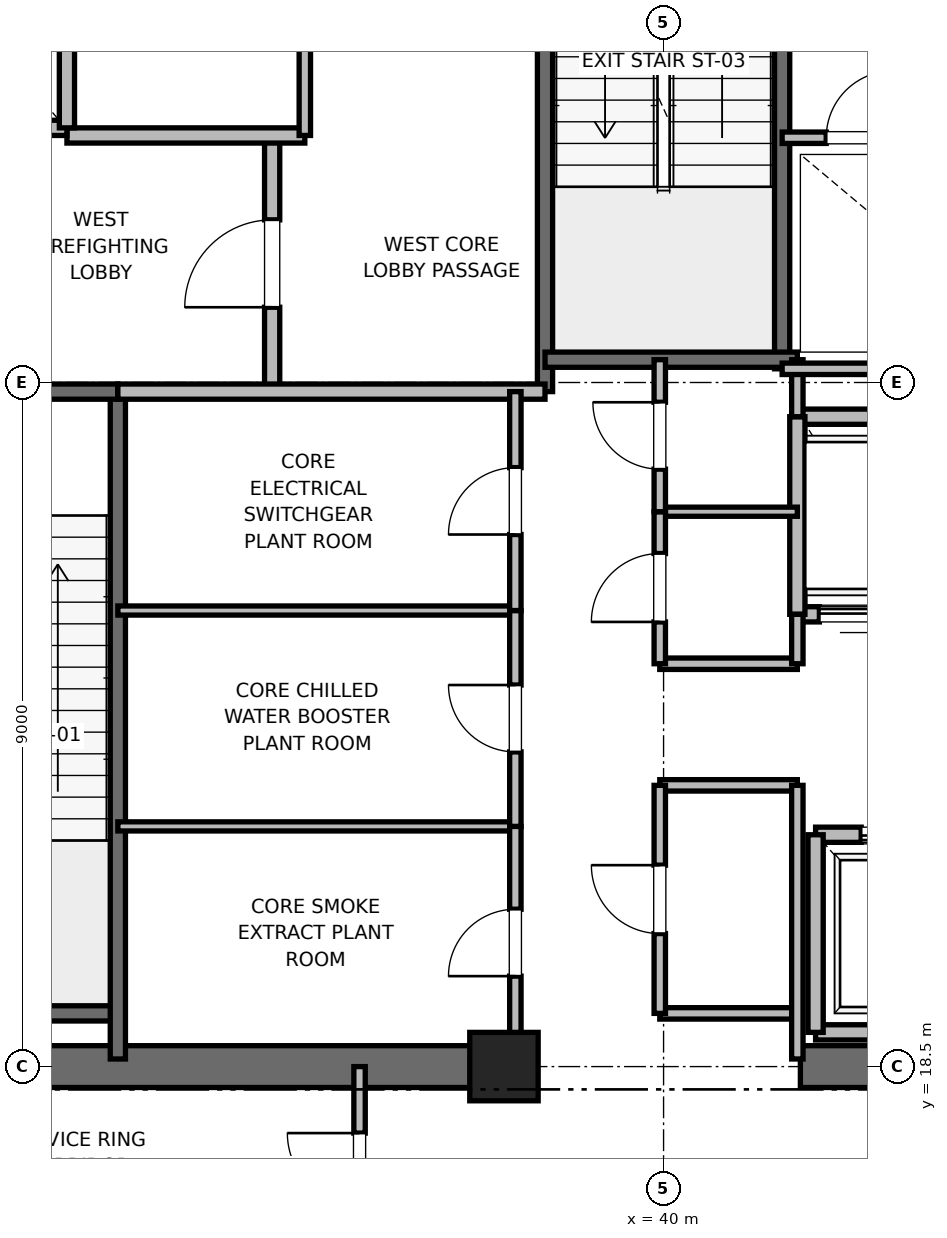
"""IFC4 building model, lengths in metres.
Left out: names, types, materials, properties, quantities, classifications, styles, units other than length and angle.
Written with IfcOpenShell. Run it as: python <this file> out.ifc"""

import sys

from ifc_helpers import new_model, si_unit, direction, frame, frame_2d, origin, origin_2d, place, context, subcontext, project, spatial, rectangle, extrude, element, fill, save


model = new_model("IFC4")
c1 = context("Model", 3, precision=1e-05, world=origin(), true_north=direction((0.0, 1.0)))
c2 = subcontext(c1, "Body", "Model", "MODEL_VIEW")
j1 = project(units=[si_unit("LENGTHUNIT", "METRE"), si_unit("PLANEANGLEUNIT", "RADIAN")], contexts=[c1])
p1 = place(None, origin())
s1 = spatial("IfcSite", under=j1, at=p1, CompositionType="ELEMENT")
p2 = place(p1, origin())
s2 = spatial("IfcBuilding", under=s1, at=p2, CompositionType="ELEMENT")
p3 = place(p2, frame((0.0, 0.0, 194.8)))
s3 = spatial("IfcBuildingStorey", under=s2, at=p3, CompositionType="ELEMENT", Elevation=194.8)
p4 = place(p3, frame((37.9, 18.5, 0.0), z_axis=(0.0, 0.0, 1.0), x_axis=(1.0, 0.0, 0.0)))
e1 = element("IfcColumn", 1, at=p4, inside=s3, PredefinedType="PILASTER", context=c2, shape_type="SweptSolid", body=[
    extrude(rectangle(XDim=0.9, YDim=0.9, at=origin_2d()), origin(), (0.0, 0.0, 1.0), 5.4),
])
for number, where, z_axis, x_axis in (
    (2, (29.0, 18.5, 0.0), (0.0, 0.0, 1.0), (1.0, 0.0, 0.0)),
    (3, (41.8, 18.5, 0.0), (0.0, 0.0, 1.0), (1.0, 0.0, 0.0)),
):
    element("IfcWall", number, at=place(p3, frame(where, z_axis=z_axis, x_axis=x_axis)), inside=s3, PredefinedType="SHEAR", context=c2, shape_type="SweptSolid", body=[
        extrude(rectangle(XDim=9.2, YDim=0.55, at=frame_2d((4.6, 0.0))), origin(), (0.0, 0.0, 1.0), 5.1),
    ])
p5 = place(p3, frame((29.7, 19.2, 0.0), z_axis=(0.0, 0.0, 1.0), x_axis=(1.0, 0.0, 0.0)))
e4 = element("IfcWall", 4, at=p5, inside=s3, PredefinedType="SOLIDWALL", context=c2, shape_type="SweptSolid", body=[
    extrude(rectangle(XDim=3.12, YDim=0.2, at=frame_2d((1.56, 0.0))), origin(), (0.0, 0.0, 1.0), 5.1),
])
p6 = place(p3, frame((32.82, 18.6, 0.0), z_axis=(0.0, 0.0, 1.0), x_axis=(0.0, 1.0, 0.0)))
e5 = element("IfcWall", 5, at=p6, inside=s3, PredefinedType="SOLIDWALL", context=c2, shape_type="SweptSolid", body=[
    extrude(rectangle(XDim=8.78, YDim=0.2, at=frame_2d((4.39, 0.0))), origin(), (0.0, 0.0, 1.0), 5.1),
])
p7 = place(p3, frame((29.7, 27.38, 0.0), z_axis=(0.0, 0.0, 1.0), x_axis=(1.0, 0.0, 0.0)))
e6 = element("IfcWall", 6, at=p7, inside=s3, PredefinedType="SOLIDWALL", context=c2, shape_type="SweptSolid", body=[
    extrude(rectangle(XDim=3.12, YDim=0.2, at=frame_2d((1.56, 0.0))), origin(), (0.0, 0.0, 1.0), 5.1),
])
p8 = place(p7, frame((1.01, 0.0, 0.0)))
e7 = element("IfcOpeningElement", 7, at=p8, cuts=e6, PredefinedType="OPENING", context=c2, shape_type="SweptSolid", body=[
    extrude(rectangle(XDim=1.1, YDim=2.15, at=frame_2d((0.55, 1.075))), frame((0.0, 0.1, 0.0), z_axis=(0.0, -1.0, 0.0), x_axis=(1.0, 0.0, 0.0)), (0.0, 0.0, 1.0), 0.2),
])
p9 = place(p3, frame((38.44, 27.38, 0.0), z_axis=(0.0, 0.0, 1.0), x_axis=(0.0, 1.0, 0.0)))
e8 = element("IfcWall", 8, at=p9, inside=s3, PredefinedType="SOLIDWALL", context=c2, shape_type="SweptSolid", body=[
    extrude(rectangle(XDim=8.87, YDim=0.2, at=frame_2d((4.435, 0.0))), origin(), (0.0, 0.0, 1.0), 5.1),
])
p10 = place(p3, frame((41.56, 27.68, 0.0), z_axis=(0.0, 0.0, 1.0), x_axis=(0.0, 1.0, 0.0)))
e9 = element("IfcWall", 9, at=p10, inside=s3, PredefinedType="SOLIDWALL", context=c2, shape_type="SweptSolid", body=[
    extrude(rectangle(XDim=8.57, YDim=0.2, at=frame_2d((4.285, 0.0))), origin(), (0.0, 0.0, 1.0), 5.1),
])
p11 = place(p3, frame((38.44, 27.8, 0.0), z_axis=(0.0, 0.0, 1.0), x_axis=(1.0, 0.0, 0.0)))
e10 = element("IfcWall", 10, at=p11, inside=s3, PredefinedType="SOLIDWALL", context=c2, shape_type="SweptSolid", body=[
    extrude(rectangle(XDim=3.32, YDim=0.2, at=frame_2d((1.66, 0.0))), origin(), (0.0, 0.0, 1.0), 5.1),
])
p12 = place(p3, frame((34.85, 27.38, 0.0), z_axis=(0.0, 0.0, 1.0), x_axis=(0.0, 1.0, 0.0)))
e11 = element("IfcWall", 11, at=p12, inside=s3, PredefinedType="PARTITIONING", context=c2, shape_type="SweptSolid", body=[
    extrude(rectangle(XDim=3.37, YDim=0.2, at=frame_2d((1.685, 0.0))), origin(), (0.0, 0.0, 1.0), 5.1),
])
p13 = place(p12, frame((1.11, 0.0, 0.0)))
e12 = element("IfcOpeningElement", 12, at=p13, cuts=e11, PredefinedType="OPENING", context=c2, shape_type="SweptSolid", body=[
    extrude(rectangle(XDim=1.15, YDim=2.2, at=frame_2d((0.575, 1.1))), frame((0.0, 0.1, 0.0), z_axis=(0.0, -1.0, 0.0), x_axis=(1.0, 0.0, 0.0)), (0.0, 0.0, 1.0), 0.2),
])
p14 = place(p3, frame((32.82, 27.38, 0.0), z_axis=(0.0, 0.0, 1.0), x_axis=(1.0, 0.0, 0.0)))
e13 = element("IfcWall", 13, at=p14, inside=s3, PredefinedType="PARTITIONING", context=c2, shape_type="SweptSolid", body=[
    extrude(rectangle(XDim=5.62, YDim=0.2, at=frame_2d((2.81, 0.0))), origin(), (0.0, 0.0, 1.0), 5.1),
])
p15 = place(p3, frame((32.15, 30.75, 0.0), z_axis=(0.0, 0.0, 1.0), x_axis=(1.0, 0.0, 0.0)))
e14 = element("IfcWall", 14, at=p15, inside=s3, PredefinedType="PARTITIONING", context=c2, shape_type="SweptSolid", body=[
    extrude(rectangle(XDim=3.13, YDim=0.2, at=frame_2d((1.565, 0.0))), origin(), (0.0, 0.0, 1.0), 5.1),
])
p16 = place(p3, frame((29.55, 30.85, 0.0), z_axis=(0.0, 0.0, 1.0), x_axis=(1.0, 0.0, 0.0)))
e15 = element("IfcWall", 15, at=p16, inside=s3, PredefinedType="SOLIDWALL", context=c2, shape_type="SweptSolid", body=[
    extrude(rectangle(XDim=2.6, YDim=0.2, at=frame_2d((1.3, 0.0))), origin(), (0.0, 0.0, 1.0), 4.08),
])
p17 = place(p16, frame((0.75, 0.0, 0.0)))
e16 = element("IfcOpeningElement", 16, at=p17, cuts=e15, PredefinedType="OPENING", context=c2, shape_type="SweptSolid", body=[
    extrude(rectangle(XDim=1.1, YDim=2.2, at=frame_2d((0.55, 1.1))), frame((0.0, 0.1, 0.0), z_axis=(0.0, -1.0, 0.0), x_axis=(1.0, 0.0, 0.0)), (0.0, 0.0, 1.0), 0.2),
])
p18 = place(p3, frame((32.15, 30.85, 0.0), z_axis=(0.0, 0.0, 1.0), x_axis=(0.0, 1.0, 0.0)))
e17 = element("IfcWall", 17, at=p18, inside=s3, PredefinedType="SOLIDWALL", context=c2, shape_type="SweptSolid", body=[
    extrude(rectangle(XDim=3.0, YDim=0.2, at=frame_2d((1.5, 0.0))), origin(), (0.0, 0.0, 1.0), 5.1),
])
p19 = place(p3, frame((42.0, 18.95, 0.0), z_axis=(0.0, 0.0, 1.0), x_axis=(1.0, 0.0, 0.0)))
e18 = element("IfcWall", 18, at=p19, inside=s3, PredefinedType="SOLIDWALL", context=c2, shape_type="SweptSolid", body=[
    extrude(rectangle(XDim=2.3, YDim=0.2, at=frame_2d((1.15, 0.0))), origin(), (0.0, 0.0, 1.0), 4.08),
])
p20 = place(p3, frame((44.3, 21.55, 0.0), z_axis=(0.0, 0.0, 1.0), x_axis=(-1.0, 0.0, 0.0)))
e19 = element("IfcWall", 19, at=p20, inside=s3, PredefinedType="SOLIDWALL", context=c2, shape_type="SweptSolid", body=[
    extrude(rectangle(XDim=2.3, YDim=0.2, at=frame_2d((1.15, 0.0))), origin(), (0.0, 0.0, 1.0), 5.1),
])
p21 = place(p20, frame((0.6, 0.0, 0.0)))
e20 = element("IfcOpeningElement", 20, at=p21, cuts=e19, PredefinedType="OPENING", context=c2, shape_type="SweptSolid", body=[
    extrude(rectangle(XDim=1.1, YDim=2.2, at=frame_2d((0.55, 1.1))), frame((0.0, 0.1, 0.0), z_axis=(0.0, -1.0, 0.0), x_axis=(1.0, 0.0, 0.0)), (0.0, 0.0, 1.0), 0.2),
])
p22 = place(p3, frame((42.0, 21.55, 0.0), z_axis=(0.0, 0.0, 1.0), x_axis=(0.0, -1.0, 0.0)))
e21 = element("IfcWall", 21, at=p22, inside=s3, PredefinedType="SOLIDWALL", context=c2, shape_type="SweptSolid", body=[
    extrude(rectangle(XDim=2.6, YDim=0.2, at=frame_2d((1.3, 0.0))), origin(), (0.0, 0.0, 1.0), 4.08),
])
p23 = place(p3, frame((41.76, 24.45, 0.0), z_axis=(0.0, 0.0, 1.0), x_axis=(1.0, 0.0, 0.0)))
e22 = element("IfcWall", 22, at=p23, inside=s3, PredefinedType="SOLIDWALL", context=c2, shape_type="SweptSolid", body=[
    extrude(rectangle(XDim=1.68, YDim=0.2, at=frame_2d((0.84, 0.0))), origin(), (0.0, 0.0, 1.0), 5.1),
])
p24 = place(p23, frame((0.29, 0.0, 0.0)))
e23 = element("IfcOpeningElement", 23, at=p24, cuts=e22, PredefinedType="OPENING", context=c2, shape_type="SweptSolid", body=[
    extrude(rectangle(XDim=1.1, YDim=2.2, at=frame_2d((0.55, 1.1))), frame((0.0, 0.1, 0.0), z_axis=(0.0, -1.0, 0.0), x_axis=(1.0, 0.0, 0.0)), (0.0, 0.0, 1.0), 0.2),
])
p25 = place(p3, frame((43.44, 27.05, 0.0), z_axis=(0.0, 0.0, 1.0), x_axis=(-1.0, 0.0, 0.0)))
e24 = element("IfcWall", 24, at=p25, inside=s3, PredefinedType="SOLIDWALL", context=c2, shape_type="SweptSolid", body=[
    extrude(rectangle(XDim=1.68, YDim=0.2, at=frame_2d((0.84, 0.0))), origin(), (0.0, 0.0, 1.0), 5.1),
])
p26 = place(p3, frame((41.76, 27.05, 0.0), z_axis=(0.0, 0.0, 1.0), x_axis=(0.0, -1.0, 0.0)))
e25 = element("IfcWall", 25, at=p26, inside=s3, PredefinedType="SOLIDWALL", context=c2, shape_type="SweptSolid", body=[
    extrude(rectangle(XDim=2.6, YDim=0.2, at=frame_2d((1.3, 0.0))), origin(), (0.0, 0.0, 1.0), 5.1),
])
for number, where, z_axis, x_axis in (
    (26, (39.95, 19.2, 0.0), (0.0, 0.0, 1.0), (1.0, 0.0, 0.0)),
    (27, (39.95, 22.2, 0.0), (0.0, 0.0, 1.0), (1.0, 0.0, 0.0)),
    (28, (39.95, 23.8, 0.0), (0.0, 0.0, 1.0), (1.0, 0.0, 0.0)),
):
    element("IfcWall", number, at=place(p3, frame(where, z_axis=z_axis, x_axis=x_axis)), inside=s3, PredefinedType="PARTITIONING", context=c2, shape_type="SweptSolid", body=[
        extrude(rectangle(XDim=1.81, YDim=0.15, at=frame_2d((0.905, 0.0))), origin(), (0.0, 0.0, 1.0), 2.85),
    ])
p27 = place(p3, frame((39.95, 25.8, 0.0), z_axis=(0.0, 0.0, 1.0), x_axis=(1.0, 0.0, 0.0)))
e29 = element("IfcWall", 29, at=p27, inside=s3, PredefinedType="PARTITIONING", context=c2, shape_type="SweptSolid", body=[
    extrude(rectangle(XDim=1.81, YDim=0.12, at=frame_2d((0.905, 0.0))), origin(), (0.0, 0.0, 1.0), 2.85),
])
p28 = place(p3, frame((41.76, 18.6, 0.0), z_axis=(0.0, 0.0, 1.0), x_axis=(0.0, 1.0, 0.0)))
e30 = element("IfcWall", 30, at=p28, inside=s3, PredefinedType="PARTITIONING", context=c2, shape_type="SweptSolid", body=[
    extrude(rectangle(XDim=3.6, YDim=0.15, at=frame_2d((1.8, 0.0))), origin(), (0.0, 0.0, 1.0), 2.85),
])
p29 = place(p3, frame((41.76, 23.8, 0.0), z_axis=(0.0, 0.0, 1.0), x_axis=(0.0, 1.0, 0.0)))
e31 = element("IfcWall", 31, at=p29, inside=s3, PredefinedType="PARTITIONING", context=c2, shape_type="SweptSolid", body=[
    extrude(rectangle(XDim=0.65, YDim=0.15, at=frame_2d((0.325, 0.0))), origin(), (0.0, 0.0, 1.0), 2.85),
])
p30 = place(p3, frame((41.76, 27.05, 0.0), z_axis=(0.0, 0.0, 1.0), x_axis=(0.0, 1.0, 0.0)))
e32 = element("IfcWall", 32, at=p30, inside=s3, PredefinedType="PARTITIONING", context=c2, shape_type="SweptSolid", body=[
    extrude(rectangle(XDim=0.75, YDim=0.15, at=frame_2d((0.375, 0.0))), origin(), (0.0, 0.0, 1.0), 2.85),
])
p31 = place(p3, frame((39.95, 19.2, 0.0), z_axis=(0.0, 0.0, 1.0), x_axis=(0.0, 1.0, 0.0)))
e33 = element("IfcWall", 33, at=p31, inside=s3, PredefinedType="PARTITIONING", context=c2, shape_type="SweptSolid", body=[
    extrude(rectangle(XDim=3.0, YDim=0.15, at=frame_2d((1.5, 0.0))), origin(), (0.0, 0.0, 1.0), 2.85),
])
p32 = place(p31, frame((1.05, 0.0, 0.0)))
e34 = element("IfcOpeningElement", 34, at=p32, cuts=e33, PredefinedType="OPENING", context=c2, shape_type="SweptSolid", body=[
    extrude(rectangle(XDim=0.9, YDim=2.1, at=frame_2d((0.45, 1.05))), frame((0.0, 0.075, 0.0), z_axis=(0.0, -1.0, 0.0), x_axis=(1.0, 0.0, 0.0)), (0.0, 0.0, 1.0), 0.15),
])
p33 = place(p3, frame((39.95, 23.8, 0.0), z_axis=(0.0, 0.0, 1.0), x_axis=(0.0, 1.0, 0.0)))
e35 = element("IfcWall", 35, at=p33, inside=s3, PredefinedType="PARTITIONING", context=c2, shape_type="SweptSolid", body=[
    extrude(rectangle(XDim=2.0, YDim=0.15, at=frame_2d((1.0, 0.0))), origin(), (0.0, 0.0, 1.0), 2.85),
])
p34 = place(p33, frame((0.55, 0.0, 0.0)))
e36 = element("IfcOpeningElement", 36, at=p34, cuts=e35, PredefinedType="OPENING", context=c2, shape_type="SweptSolid", body=[
    extrude(rectangle(XDim=0.9, YDim=2.1, at=frame_2d((0.45, 1.05))), frame((0.0, 0.075, 0.0), z_axis=(0.0, -1.0, 0.0), x_axis=(1.0, 0.0, 0.0)), (0.0, 0.0, 1.0), 0.15),
])
p35 = place(p3, frame((39.95, 25.8, 0.0), z_axis=(0.0, 0.0, 1.0), x_axis=(0.0, 1.0, 0.0)))
e37 = element("IfcWall", 37, at=p35, inside=s3, PredefinedType="PARTITIONING", context=c2, shape_type="SweptSolid", body=[
    extrude(rectangle(XDim=2.0, YDim=0.15, at=frame_2d((1.0, 0.0))), origin(), (0.0, 0.0, 1.0), 2.85),
])
p36 = place(p35, frame((0.56, 0.0, 0.0)))
e38 = element("IfcOpeningElement", 38, at=p36, cuts=e37, PredefinedType="OPENING", context=c2, shape_type="SweptSolid", body=[
    extrude(rectangle(XDim=0.88, YDim=2.1, at=frame_2d((0.44, 1.05))), frame((0.0, 0.075, 0.0), z_axis=(0.0, -1.0, 0.0), x_axis=(1.0, 0.0, 0.0)), (0.0, 0.0, 1.0), 0.15),
])
p37 = place(p3, frame((35.28, 30.75, 0.0), z_axis=(0.0, 0.0, 1.0), x_axis=(0.0, 1.0, 0.0)))
e39 = element("IfcWall", 39, at=p37, inside=s3, PredefinedType="PARTITIONING", context=c2, shape_type="SweptSolid", body=[
    extrude(rectangle(XDim=3.2, YDim=0.15, at=frame_2d((1.6, 0.0))), origin(), (0.0, 0.0, 1.0), 2.85),
])
p38 = place(p37, frame((1.15, 0.0, 0.0)))
e40 = element("IfcOpeningElement", 40, at=p38, cuts=e39, PredefinedType="OPENING", context=c2, shape_type="SweptSolid", body=[
    extrude(rectangle(XDim=0.9, YDim=2.1, at=frame_2d((0.45, 1.05))), frame((0.0, 0.075, 0.0), z_axis=(0.0, -1.0, 0.0), x_axis=(1.0, 0.0, 0.0)), (0.0, 0.0, 1.0), 0.15),
])
for number, where, z_axis, x_axis in (
    (41, (32.82, 21.66, 0.0), (0.0, 0.0, 1.0), (1.0, 0.0, 0.0)),
    (42, (32.82, 24.5, 0.0), (0.0, 0.0, 1.0), (1.0, 0.0, 0.0)),
):
    element("IfcWall", number, at=place(p3, frame(where, z_axis=z_axis, x_axis=x_axis)), inside=s3, PredefinedType="PARTITIONING", context=c2, shape_type="SweptSolid", body=[
        extrude(rectangle(XDim=5.23, YDim=0.12, at=frame_2d((2.615, 0.0))), origin(), (0.0, 0.0, 1.0), 2.85),
    ])
p39 = place(p3, frame((38.05, 18.6, 0.0), z_axis=(0.0, 0.0, 1.0), x_axis=(0.0, 1.0, 0.0)))
e43 = element("IfcWall", 43, at=p39, inside=s3, PredefinedType="PARTITIONING", context=c2, shape_type="SweptSolid", body=[
    extrude(rectangle(XDim=3.06, YDim=0.15, at=frame_2d((1.53, 0.0))), origin(), (0.0, 0.0, 1.0), 2.85),
])
p40 = place(p39, frame((1.09, 0.0, 0.0)))
e44 = element("IfcOpeningElement", 44, at=p40, cuts=e43, PredefinedType="OPENING", context=c2, shape_type="SweptSolid", body=[
    extrude(rectangle(XDim=0.88, YDim=2.1, at=frame_2d((0.44, 1.05))), frame((0.0, 0.075, 0.0), z_axis=(0.0, -1.0, 0.0), x_axis=(1.0, 0.0, 0.0)), (0.0, 0.0, 1.0), 0.15),
])
p41 = place(p3, frame((38.05, 21.66, 0.0), z_axis=(0.0, 0.0, 1.0), x_axis=(0.0, 1.0, 0.0)))
e45 = element("IfcWall", 45, at=p41, inside=s3, PredefinedType="PARTITIONING", context=c2, shape_type="SweptSolid", body=[
    extrude(rectangle(XDim=2.84, YDim=0.15, at=frame_2d((1.42, 0.0))), origin(), (0.0, 0.0, 1.0), 2.85),
])
p42 = place(p41, frame((0.98, 0.0, 0.0)))
e46 = element("IfcOpeningElement", 46, at=p42, cuts=e45, PredefinedType="OPENING", context=c2, shape_type="SweptSolid", body=[
    extrude(rectangle(XDim=0.88, YDim=2.1, at=frame_2d((0.44, 1.05))), frame((0.0, 0.075, 0.0), z_axis=(0.0, -1.0, 0.0), x_axis=(1.0, 0.0, 0.0)), (0.0, 0.0, 1.0), 0.15),
])
p43 = place(p3, frame((38.05, 24.5, 0.0), z_axis=(0.0, 0.0, 1.0), x_axis=(0.0, 1.0, 0.0)))
e47 = element("IfcWall", 47, at=p43, inside=s3, PredefinedType="PARTITIONING", context=c2, shape_type="SweptSolid", body=[
    extrude(rectangle(XDim=2.88, YDim=0.15, at=frame_2d((1.44, 0.0))), origin(), (0.0, 0.0, 1.0), 2.85),
])
p44 = place(p43, frame((1.0, 0.0, 0.0)))
e48 = element("IfcOpeningElement", 48, at=p44, cuts=e47, PredefinedType="OPENING", context=c2, shape_type="SweptSolid", body=[
    extrude(rectangle(XDim=0.88, YDim=2.1, at=frame_2d((0.44, 1.05))), frame((0.0, 0.075, 0.0), z_axis=(0.0, -1.0, 0.0), x_axis=(1.0, 0.0, 0.0)), (0.0, 0.0, 1.0), 0.15),
])
p45 = place(p3, frame((41.56, 27.68, 0.0), z_axis=(0.0, 0.0, 1.0), x_axis=(1.0, 0.0, 0.0)))
e49 = element("IfcWall", 49, at=p45, inside=s3, PredefinedType="PARTITIONING", context=c2, shape_type="SweptSolid", body=[
    extrude(rectangle(XDim=3.59, YDim=0.15, at=frame_2d((1.795, 0.0))), origin(), (0.0, 0.0, 1.0), 2.85),
])
p46 = place(p3, frame((41.56, 30.72, 0.0), z_axis=(0.0, 0.0, 1.0), x_axis=(1.0, 0.0, 0.0)))
e50 = element("IfcWall", 50, at=p46, inside=s3, PredefinedType="PARTITIONING", context=c2, shape_type="SweptSolid", body=[
    extrude(rectangle(XDim=2.04, YDim=0.15, at=frame_2d((1.02, 0.0))), origin(), (0.0, 0.0, 1.0), 2.85),
])
p47 = place(p46, frame((0.58, 0.0, 0.0)))
e51 = element("IfcOpeningElement", 51, at=p47, cuts=e50, PredefinedType="OPENING", context=c2, shape_type="SweptSolid", body=[
    extrude(rectangle(XDim=0.88, YDim=2.1, at=frame_2d((0.44, 1.05))), frame((0.0, 0.075, 0.0), z_axis=(0.0, -1.0, 0.0), x_axis=(1.0, 0.0, 0.0)), (0.0, 0.0, 1.0), 0.15),
])
p48 = place(p3, frame((36.0, 15.8, 0.0), z_axis=(0.0, 0.0, 1.0), x_axis=(0.0, 1.0, 0.0)))
e52 = element("IfcWall", 52, at=p48, inside=s3, PredefinedType="PARTITIONING", context=c2, shape_type="SweptSolid", body=[
    extrude(rectangle(XDim=2.7, YDim=0.15, at=frame_2d((1.35, 0.0))), origin(), (0.0, 0.0, 1.0), 2.85),
])
p49 = place(p48, frame((0.875, 0.0, 0.0)))
e53 = element("IfcOpeningElement", 53, at=p49, cuts=e52, PredefinedType="OPENING", context=c2, shape_type="SweptSolid", body=[
    extrude(rectangle(XDim=0.95, YDim=2.15, at=frame_2d((0.475, 1.075))), frame((0.0, 0.075, 0.0), z_axis=(0.0, -1.0, 0.0), x_axis=(1.0, 0.0, 0.0)), (0.0, 0.0, 1.0), 0.15),
])
p50 = place(p13, origin())
e54 = element("IfcDoor", 54, at=p50, inside=s3, OperationType="SINGLE_SWING_LEFT", PredefinedType="DOOR", context=c2, shape_type="SweptSolid", body=[
    extrude(rectangle(XDim=1.15, YDim=2.2, at=frame_2d((0.575, 1.1))), frame((0.0, 0.025, 0.0), z_axis=(0.0, -1.0, 0.0), x_axis=(1.0, 0.0, 0.0)), (0.0, 0.0, 1.0), 0.05),
])
fill(e12, e54)
p51 = place(p21, origin())
e55 = element("IfcDoor", 55, at=p51, inside=s3, OperationType="SLIDING_TO_RIGHT", PredefinedType="DOOR", context=c2, shape_type="SweptSolid", body=[
    extrude(rectangle(XDim=1.1, YDim=2.2, at=frame_2d((0.55, 1.1))), frame((0.0, 0.025, 0.0), z_axis=(0.0, -1.0, 0.0), x_axis=(1.0, 0.0, 0.0)), (0.0, 0.0, 1.0), 0.05),
])
fill(e20, e55)
p52 = place(p24, origin())
e56 = element("IfcDoor", 56, at=p52, inside=s3, OperationType="SLIDING_TO_RIGHT", PredefinedType="DOOR", context=c2, shape_type="SweptSolid", body=[
    extrude(rectangle(XDim=1.1, YDim=2.2, at=frame_2d((0.55, 1.1))), frame((0.0, 0.025, 0.0), z_axis=(0.0, -1.0, 0.0), x_axis=(1.0, 0.0, 0.0)), (0.0, 0.0, 1.0), 0.05),
])
fill(e23, e56)
p53 = place(p32, origin())
e57 = element("IfcDoor", 57, at=p53, inside=s3, OperationType="SINGLE_SWING_RIGHT", PredefinedType="DOOR", context=c2, shape_type="SweptSolid", body=[
    extrude(rectangle(XDim=0.9, YDim=2.1, at=frame_2d((0.45, 1.05))), frame((0.0, 0.025, 0.0), z_axis=(0.0, -1.0, 0.0), x_axis=(1.0, 0.0, 0.0)), (0.0, 0.0, 1.0), 0.05),
])
fill(e34, e57)
p54 = place(p34, origin())
e58 = element("IfcDoor", 58, at=p54, inside=s3, OperationType="SINGLE_SWING_LEFT", PredefinedType="DOOR", context=c2, shape_type="SweptSolid", body=[
    extrude(rectangle(XDim=0.9, YDim=2.1, at=frame_2d((0.45, 1.05))), frame((0.0, 0.025, 0.0), z_axis=(0.0, -1.0, 0.0), x_axis=(1.0, 0.0, 0.0)), (0.0, 0.0, 1.0), 0.05),
])
fill(e36, e58)
p55 = place(p36, origin())
e59 = element("IfcDoor", 59, at=p55, inside=s3, OperationType="SINGLE_SWING_RIGHT", PredefinedType="DOOR", context=c2, shape_type="SweptSolid", body=[
    extrude(rectangle(XDim=0.88, YDim=2.1, at=frame_2d((0.44, 1.05))), frame((0.0, 0.025, 0.0), z_axis=(0.0, -1.0, 0.0), x_axis=(1.0, 0.0, 0.0)), (0.0, 0.0, 1.0), 0.05),
])
fill(e38, e59)
p56 = place(p40, origin())
e60 = element("IfcDoor", 60, at=p56, inside=s3, OperationType="SINGLE_SWING_LEFT", PredefinedType="DOOR", context=c2, shape_type="SweptSolid", body=[
    extrude(rectangle(XDim=0.88, YDim=2.1, at=frame_2d((0.44, 1.05))), frame((0.0, 0.025, 0.0), z_axis=(0.0, -1.0, 0.0), x_axis=(1.0, 0.0, 0.0)), (0.0, 0.0, 1.0), 0.05),
])
fill(e44, e60)
p57 = place(p42, origin())
e61 = element("IfcDoor", 61, at=p57, inside=s3, OperationType="SINGLE_SWING_RIGHT", PredefinedType="DOOR", context=c2, shape_type="SweptSolid", body=[
    extrude(rectangle(XDim=0.88, YDim=2.1, at=frame_2d((0.44, 1.05))), frame((0.0, 0.025, 0.0), z_axis=(0.0, -1.0, 0.0), x_axis=(1.0, 0.0, 0.0)), (0.0, 0.0, 1.0), 0.05),
])
fill(e46, e61)
p58 = place(p44, origin())
e62 = element("IfcDoor", 62, at=p58, inside=s3, OperationType="SINGLE_SWING_LEFT", PredefinedType="DOOR", context=c2, shape_type="SweptSolid", body=[
    extrude(rectangle(XDim=0.88, YDim=2.1, at=frame_2d((0.44, 1.05))), frame((0.0, 0.025, 0.0), z_axis=(0.0, -1.0, 0.0), x_axis=(1.0, 0.0, 0.0)), (0.0, 0.0, 1.0), 0.05),
])
fill(e48, e62)
p59 = place(p47, origin())
e63 = element("IfcDoor", 63, at=p59, inside=s3, OperationType="SINGLE_SWING_RIGHT", PredefinedType="DOOR", context=c2, shape_type="SweptSolid", body=[
    extrude(rectangle(XDim=0.88, YDim=2.1, at=frame_2d((0.44, 1.05))), frame((0.0, 0.025, 0.0), z_axis=(0.0, -1.0, 0.0), x_axis=(1.0, 0.0, 0.0)), (0.0, 0.0, 1.0), 0.05),
])
fill(e51, e63)
p60 = place(p49, origin())
e64 = element("IfcDoor", 64, at=p60, inside=s3, OperationType="SINGLE_SWING_RIGHT", PredefinedType="DOOR", context=c2, shape_type="SweptSolid", body=[
    extrude(rectangle(XDim=0.95, YDim=2.15, at=frame_2d((0.475, 1.075))), frame((0.0, 0.025, 0.0), z_axis=(0.0, -1.0, 0.0), x_axis=(1.0, 0.0, 0.0)), (0.0, 0.0, 1.0), 0.05),
])
fill(e53, e64)
save(model, sys.argv[1])
